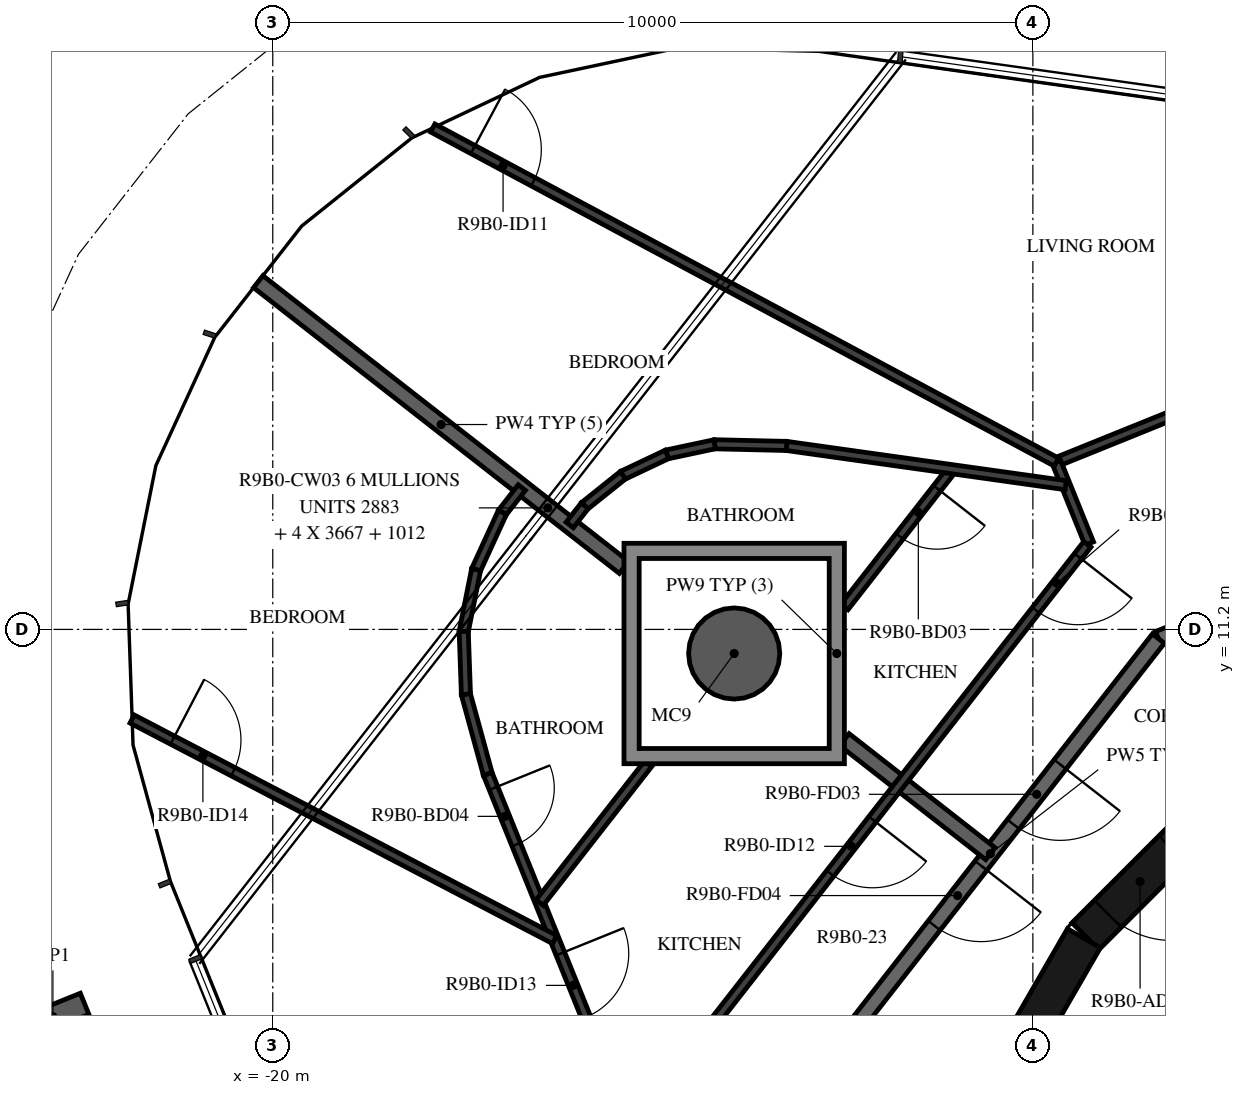
"""IFC4 building model, lengths in metres.
Left out: names, types, materials, properties, quantities, classifications, styles, units other than length and angle.
Written with IfcOpenShell. Run it as: python <this file> out.ifc"""

import sys

from ifc_helpers import new_model, si_unit, direction, frame, frame_2d, origin, origin_2d, place, context, subcontext, project, spatial, polyline, rectangle, hollow_circle, i_section, outline, extrude, element, fill, save


model = new_model("IFC4")
c1 = context("Model", 3, precision=1e-05, world=origin(), true_north=direction((0.0, 1.0)))
c2 = subcontext(c1, "Body", "Model", "MODEL_VIEW")
j1 = project(units=[si_unit("LENGTHUNIT", "METRE"), si_unit("PLANEANGLEUNIT", "RADIAN")], contexts=[c1])
p1 = place(None, origin())
s1 = spatial("IfcSite", under=j1, at=p1, CompositionType="ELEMENT")
p2 = place(p1, origin())
s2 = spatial("IfcBuilding", under=s1, at=p2, CompositionType="ELEMENT")
p3 = place(p2, frame((0.0, 0.0, 347.0)))
s3 = spatial("IfcBuildingStorey", under=s2, at=p3, CompositionType="ELEMENT", Elevation=347.0)
p4 = place(p3, frame((-13.929, 10.883, -0.38), z_axis=(0.0, 0.0, 1.0), x_axis=(1.0, 0.0, 0.0)))
e1 = element("IfcColumn", 1, at=p4, inside=s3, PredefinedType="COLUMN", context=c2, shape_type="SweptSolid", body=[
    extrude(hollow_circle(Radius=0.6, WallThickness=0.03, at=origin_2d()), origin(), (0.0, 0.0, 1.0), 3.5),
])
p5 = place(p3, frame((-22.893, 6.106, -0.38), z_axis=(0.0, 0.0, 1.0), x_axis=(-0.374606892434, 0.927183733755, 0.0)))
e2 = element("IfcColumn", 2, at=p5, inside=s3, PredefinedType="COLUMN", context=c2, shape_type="SweptSolid", body=[
    extrude(i_section(OverallWidth=0.3, OverallDepth=0.9, WebThickness=0.019, FlangeThickness=0.035, FilletRadius=0.03, at=origin_2d()), origin(), (0.0, 0.0, 1.0), 3.5),
])
p6 = place(p3, frame((-7.164, 9.308, 0.0), z_axis=(0.0, 0.0, 1.0), x_axis=(-0.707106781187, -0.707106781187, 0.0)))
e3 = element("IfcWall", 3, at=p6, inside=s3, PredefinedType="SHEAR", context=c2, shape_type="SweptSolid", body=[
    extrude(rectangle(XDim=3.032, YDim=0.5, at=frame_2d((1.516, 0.0))), origin(), (0.0, 0.0, 1.0), 3.12),
])
p7 = place(p6, frame((1.416, 0.0, 0.0)))
e4 = element("IfcOpeningElement", 4, at=p7, cuts=e3, PredefinedType="OPENING", context=c2, shape_type="SweptSolid", body=[
    extrude(rectangle(XDim=1.2, YDim=2.1, at=frame_2d((0.6, 1.05))), frame((0.0, 0.26, 0.0), z_axis=(0.0, -1.0, 0.0), x_axis=(1.0, 0.0, 0.0)), (0.0, 0.0, 1.0), 0.52),
])
p8 = place(p3, frame((-9.329, 7.137, 0.0), z_axis=(0.0, 0.0, 1.0), x_axis=(-0.500087131594, -0.865975092491, 0.0)))
e5 = element("IfcWall", 5, at=p8, inside=s3, PredefinedType="SHEAR", context=c2, shape_type="SweptSolid", body=[
    extrude(rectangle(XDim=3.033, YDim=0.5, at=frame_2d((1.516, 0.0))), origin(), (0.0, 0.0, 1.0), 3.12),
])
p9 = place(p3, frame((-1.691, 13.769, 0.0), z_axis=(0.0, 0.0, 1.0), x_axis=(-0.92717916932, -0.374618189599, 0.0)))
e6 = element("IfcWall", 6, at=p9, inside=s3, PredefinedType="STANDARD", context=c2, shape_type="SweptSolid", body=[
    extrude(rectangle(XDim=7.181, YDim=0.2, at=frame_2d((3.591, 0.0))), origin(), (0.0, 0.0, 1.0), 3.12),
])
p10 = place(p3, frame((-8.349, 11.079, 0.0), z_axis=(0.0, 0.0, 1.0), x_axis=(-0.615669112324, -0.78800478687, 0.0)))
e7 = element("IfcWall", 7, at=p10, inside=s3, PredefinedType="STANDARD", context=c2, shape_type="SweptSolid", body=[
    extrude(rectangle(XDim=7.181, YDim=0.2, at=frame_2d((3.591, 0.0))), origin(), (0.0, 0.0, 1.0), 3.12),
])
p11 = place(p10, frame((2.1, 0.0, 0.0)))
e8 = element("IfcOpeningElement", 8, at=p11, cuts=e7, PredefinedType="OPENING", context=c2, shape_type="SweptSolid", body=[
    extrude(rectangle(XDim=1.0, YDim=2.1, at=frame_2d((0.5, 1.05))), frame((0.0, 0.11, 0.0), z_axis=(0.0, -1.0, 0.0), x_axis=(1.0, 0.0, 0.0)), (0.0, 0.0, 1.0), 0.22),
])
p12 = place(p10, frame((3.79, 0.0, 0.0)))
e9 = element("IfcOpeningElement", 9, at=p12, cuts=e7, PredefinedType="OPENING", context=c2, shape_type="SweptSolid", body=[
    extrude(rectangle(XDim=1.0, YDim=2.1, at=frame_2d((0.5, 1.05))), frame((0.0, 0.11, 0.0), z_axis=(0.0, -1.0, 0.0), x_axis=(1.0, 0.0, 0.0)), (0.0, 0.0, 1.0), 0.22),
])
p13 = place(p3, frame((-12.479, 9.75, 0.0), z_axis=(0.0, 0.0, 1.0), x_axis=(0.788050197026, -0.615610986717, 0.0)))
e10 = element("IfcWall", 10, at=p13, inside=s3, PredefinedType="STANDARD", context=c2, shape_type="SweptSolid", body=[
    extrude(rectangle(XDim=2.437, YDim=0.2, at=frame_2d((1.218, 0.0))), origin(), (0.0, 0.0, 1.0), 3.12),
])
p14 = place(p3, frame((-20.191, 15.775, 0.0), z_axis=(0.0, 0.0, 1.0), x_axis=(0.788021948923, -0.615647145706, 0.0)))
e11 = element("IfcWall", 11, at=p14, inside=s3, PredefinedType="STANDARD", context=c2, shape_type="SweptSolid", body=[
    extrude(rectangle(XDim=6.106, YDim=0.2, at=frame_2d((3.053, 0.0))), origin(), (0.0, 0.0, 1.0), 3.12),
])
p15 = place(p3, frame((-8.115, 14.039, 0.0), z_axis=(0.0, 0.0, 1.0), x_axis=(-0.927153589835, -0.374681492546, 0.0)))
e12 = element("IfcWall", 12, at=p15, inside=s3, PredefinedType="PARTITIONING", context=c2, shape_type="SweptSolid", body=[
    extrude(rectangle(XDim=1.7, YDim=0.12, at=frame_2d((0.85, 0.0))), origin(), (0.0, 0.0, 1.0), 3.12),
])
p16 = place(p3, frame((-9.691, 13.402, 0.0), z_axis=(0.0, 0.0, 1.0), x_axis=(0.374484003097, -0.927233374844, 0.0)))
e13 = element("IfcWall", 13, at=p16, inside=s3, PredefinedType="PARTITIONING", context=c2, shape_type="SweptSolid", body=[
    extrude(rectangle(XDim=1.156, YDim=0.12, at=frame_2d((0.578, 0.0))), origin(), (0.0, 0.0, 1.0), 3.12),
])
p17 = place(p3, frame((-9.283, 12.319, 0.0), z_axis=(0.0, 0.0, 1.0), x_axis=(-0.61567489546, -0.788000268464, 0.0)))
e14 = element("IfcWall", 14, at=p17, inside=s3, PredefinedType="PARTITIONING", context=c2, shape_type="SweptSolid", body=[
    extrude(rectangle(XDim=7.985, YDim=0.12, at=frame_2d((3.992, 0.0))), origin(), (0.0, 0.0, 1.0), 3.12),
])
p18 = place(p17, frame((0.2, 0.0, 0.0)))
e15 = element("IfcOpeningElement", 15, at=p18, cuts=e14, PredefinedType="OPENING", context=c2, shape_type="SweptSolid", body=[
    extrude(rectangle(XDim=0.9, YDim=2.1, at=frame_2d((0.45, 1.05))), frame((0.0, 0.07, 0.0), z_axis=(0.0, -1.0, 0.0), x_axis=(1.0, 0.0, 0.0)), (0.0, 0.0, 1.0), 0.14),
])
p19 = place(p17, frame((4.592, 0.0, 0.0)))
e16 = element("IfcOpeningElement", 16, at=p19, cuts=e14, PredefinedType="OPENING", context=c2, shape_type="SweptSolid", body=[
    extrude(rectangle(XDim=0.9, YDim=2.1, at=frame_2d((0.45, 1.05))), frame((0.0, 0.07, 0.0), z_axis=(0.0, -1.0, 0.0), x_axis=(1.0, 0.0, 0.0)), (0.0, 0.0, 1.0), 0.14),
])
p20 = place(p3, frame((-17.896, 17.797, 0.0), z_axis=(0.0, 0.0, 1.0), x_axis=(0.88150492406, -0.4721748287, 0.0)))
e17 = element("IfcWall", 17, at=p20, inside=s3, PredefinedType="PARTITIONING", context=c2, shape_type="SweptSolid", body=[
    extrude(rectangle(XDim=9.308, YDim=0.12, at=frame_2d((4.654, 0.0))), origin(), (0.0, 0.0, 1.0), 3.12),
])
p21 = place(p20, frame((0.6, 0.0, 0.0)))
e18 = element("IfcOpeningElement", 18, at=p21, cuts=e17, PredefinedType="OPENING", context=c2, shape_type="SweptSolid", body=[
    extrude(rectangle(XDim=0.9, YDim=2.1, at=frame_2d((0.45, 1.05))), frame((0.0, 0.07, 0.0), z_axis=(0.0, -1.0, 0.0), x_axis=(1.0, 0.0, 0.0)), (0.0, 0.0, 1.0), 0.14),
])
p22 = place(p3, frame((-11.064, 13.308, 0.0), z_axis=(0.0, 0.0, 1.0), x_axis=(-0.615681126827, -0.787995399777, 0.0)))
e19 = element("IfcWall", 19, at=p22, inside=s3, PredefinedType="PARTITIONING", context=c2, shape_type="SweptSolid", body=[
    extrude(rectangle(XDim=2.3, YDim=0.12, at=frame_2d((1.15, 0.0))), origin(), (0.0, 0.0, 1.0), 3.12),
])
p23 = place(p22, frame((0.32, 0.0, 0.0)))
e20 = element("IfcOpeningElement", 20, at=p23, cuts=e19, PredefinedType="OPENING", context=c2, shape_type="SweptSolid", body=[
    extrude(rectangle(XDim=0.8, YDim=2.1, at=frame_2d((0.4, 1.05))), frame((0.0, 0.07, 0.0), z_axis=(0.0, -1.0, 0.0), x_axis=(1.0, 0.0, 0.0)), (0.0, 0.0, 1.0), 0.14),
])
p24 = place(p3, frame((-9.568, 13.097, 0.0), z_axis=(0.0, 0.0, 1.0), x_axis=(-0.990266931728, 0.13918119099, 0.0)))
e21 = element("IfcWall", 21, at=p24, inside=s3, PredefinedType="PARTITIONING", context=c2, shape_type="SweptSolid", body=[
    extrude(rectangle(XDim=3.708, YDim=0.12, at=frame_2d((1.854, 0.0))), origin(), (0.0, 0.0, 1.0), 3.12),
])
p25 = place(p3, frame((-13.24, 13.614, 0.0), z_axis=(0.0, 0.0, 1.0), x_axis=(-0.999730529074, 0.023213557177, 0.0)))
e22 = element("IfcWall", 22, at=p25, inside=s3, PredefinedType="PARTITIONING", context=c2, shape_type="SweptSolid", body=[
    extrude(rectangle(XDim=0.947, YDim=0.12, at=frame_2d((0.473, 0.0))), origin(), (0.0, 0.0, 1.0), 3.12),
])
p26 = place(p3, frame((-14.186, 13.635, 0.0), z_axis=(0.0, 0.0, 1.0), x_axis=(-0.978217752025, -0.207581380725, 0.0)))
e23 = element("IfcWall", 23, at=p26, inside=s3, PredefinedType="PARTITIONING", context=c2, shape_type="SweptSolid", body=[
    extrude(rectangle(XDim=0.642, YDim=0.12, at=frame_2d((0.321, 0.0))), origin(), (0.0, 0.0, 1.0), 3.12),
])
for number, where, z_axis, x_axis in (
    (24, (-14.814, 13.502, 0.0), (0.0, 0.0, 1.0), (-0.904, -0.428, 0.0)),
    (25, (-15.395, 13.227, 0.0), (0.0, 0.0, 1.0), (-0.781, -0.625, 0.0)),
):
    element("IfcWall", number, at=place(p3, frame(where, z_axis=z_axis, x_axis=x_axis)), inside=s3, PredefinedType="PARTITIONING", context=c2, shape_type="SweptSolid", body=[
        extrude(rectangle(XDim=0.642, YDim=0.12, at=frame_2d((0.321, 0.0))), origin(), (0.0, 0.0, 1.0), 3.12),
    ])
p27 = place(p3, frame((-15.896, 12.826, 0.0), z_axis=(0.0, 0.0, 1.0), x_axis=(-0.615466865985, -0.788162760396, 0.0)))
e26 = element("IfcWall", 26, at=p27, inside=s3, PredefinedType="PARTITIONING", context=c2, shape_type="SweptSolid", body=[
    extrude(rectangle(XDim=0.321, YDim=0.12, at=frame_2d((0.16, 0.0))), origin(), (0.0, 0.0, 1.0), 3.12),
])
p28 = place(p3, frame((-16.724, 13.066, 0.0), z_axis=(0.0, 0.0, 1.0), x_axis=(-0.615895388651, -0.787827944565, 0.0)))
e27 = element("IfcWall", 27, at=p28, inside=s3, PredefinedType="PARTITIONING", context=c2, shape_type="SweptSolid", body=[
    extrude(rectangle(XDim=0.415, YDim=0.12, at=frame_2d((0.207, 0.0))), origin(), (0.0, 0.0, 1.0), 3.12),
])
for number, where, z_axis, x_axis in (
    (28, (-16.979, 12.74, 0.0), (0.0, 0.0, 1.0), (-0.417, -0.909, 0.0)),
    (29, (-17.325, 11.986, 0.0), (0.0, 0.0, 1.0), (-0.197, -0.98, 0.0)),
    (30, (-17.488, 11.173, 0.0), (0.0, 0.0, 1.0), (0.035, -0.999, 0.0)),
):
    element("IfcWall", number, at=place(p3, frame(where, z_axis=z_axis, x_axis=x_axis)), inside=s3, PredefinedType="PARTITIONING", context=c2, shape_type="SweptSolid", body=[
        extrude(rectangle(XDim=0.829, YDim=0.12, at=frame_2d((0.415, 0.0))), origin(), (0.0, 0.0, 1.0), 3.12),
    ])
p29 = place(p3, frame((-17.459, 10.345, 0.0), z_axis=(0.0, 0.0, 1.0), x_axis=(0.264409755069, -0.964410432038, 0.0)))
e31 = element("IfcWall", 31, at=p29, inside=s3, PredefinedType="PARTITIONING", context=c2, shape_type="SweptSolid", body=[
    extrude(rectangle(XDim=1.087, YDim=0.12, at=frame_2d((0.543, 0.0))), origin(), (0.0, 0.0, 1.0), 3.12),
])
p30 = place(p3, frame((-17.171, 9.297, 0.0), z_axis=(0.0, 0.0, 1.0), x_axis=(0.374594127493, -0.927188891029, 0.0)))
e32 = element("IfcWall", 32, at=p30, inside=s3, PredefinedType="PARTITIONING", context=c2, shape_type="SweptSolid", body=[
    extrude(rectangle(XDim=5.174, YDim=0.12, at=frame_2d((2.587, 0.0))), origin(), (0.0, 0.0, 1.0), 3.12),
])
p31 = place(p30, frame((2.548, 0.0, 0.0)))
e33 = element("IfcOpeningElement", 33, at=p31, cuts=e32, PredefinedType="OPENING", context=c2, shape_type="SweptSolid", body=[
    extrude(rectangle(XDim=0.9, YDim=2.1, at=frame_2d((0.45, 1.05))), frame((0.0, 0.07, 0.0), z_axis=(0.0, -1.0, 0.0), x_axis=(1.0, 0.0, 0.0)), (0.0, 0.0, 1.0), 0.14),
])
p32 = place(p30, frame((0.2, 0.0, 0.0)))
e34 = element("IfcOpeningElement", 34, at=p32, cuts=e32, PredefinedType="OPENING", context=c2, shape_type="SweptSolid", body=[
    extrude(rectangle(XDim=0.8, YDim=2.1, at=frame_2d((0.4, 1.05))), frame((0.0, 0.07, 0.0), z_axis=(0.0, -1.0, 0.0), x_axis=(1.0, 0.0, 0.0)), (0.0, 0.0, 1.0), 0.14),
])
p33 = place(p3, frame((-16.488, 7.606, 0.0), z_axis=(0.0, 0.0, 1.0), x_axis=(0.615637911154, 0.788029163388, 0.0)))
e35 = element("IfcWall", 35, at=p33, inside=s3, PredefinedType="PARTITIONING", context=c2, shape_type="SweptSolid", body=[
    extrude(rectangle(XDim=2.318, YDim=0.12, at=frame_2d((1.159, 0.0))), origin(), (0.0, 0.0, 1.0), 3.12),
])
p34 = place(p3, frame((-21.85, 10.021, 0.0), z_axis=(0.0, 0.0, 1.0), x_axis=(0.886479988406, -0.462766928546, 0.0)))
e36 = element("IfcWall", 36, at=p34, inside=s3, PredefinedType="PARTITIONING", context=c2, shape_type="SweptSolid", body=[
    extrude(rectangle(XDim=6.27, YDim=0.12, at=frame_2d((3.135, 0.0))), origin(), (0.0, 0.0, 1.0), 3.12),
])
p35 = place(p34, frame((0.6, 0.0, 0.0)))
e37 = element("IfcOpeningElement", 37, at=p35, cuts=e36, PredefinedType="OPENING", context=c2, shape_type="SweptSolid", body=[
    extrude(rectangle(XDim=0.9, YDim=2.1, at=frame_2d((0.45, 1.05))), frame((0.0, 0.07, 0.0), z_axis=(0.0, -1.0, 0.0), x_axis=(1.0, 0.0, 0.0)), (0.0, 0.0, 1.0), 0.14),
])
p36 = place(p3, origin())
e38 = element("IfcWall", 38, at=p36, inside=s3, PredefinedType="STANDARD", context=c2, shape_type="SweptSolid", body=[
    extrude(outline(polyline([(-12.479, 12.333), (-12.479, 9.433), (-15.379, 9.433), (-15.379, 12.333), (-12.479, 12.333)]), holes=[polyline([(-15.179, 9.633), (-12.679, 9.633), (-12.679, 12.133), (-15.179, 12.133), (-15.179, 9.633)])]), origin(), (0.0, 0.0, 1.0), 3.12),
])
p37 = place(p7, origin())
e39 = element("IfcDoor", 39, at=p37, inside=s3, OperationType="SINGLE_SWING_RIGHT", PredefinedType="DOOR", context=c2, shape_type="SweptSolid", body=[
    extrude(rectangle(XDim=1.2, YDim=2.1, at=frame_2d((0.6, 1.05))), frame((0.0, 0.025, 0.0), z_axis=(0.0, -1.0, 0.0), x_axis=(1.0, 0.0, 0.0)), (0.0, 0.0, 1.0), 0.05),
])
fill(e4, e39)
p38 = place(p11, origin())
e40 = element("IfcDoor", 40, at=p38, inside=s3, OperationType="SINGLE_SWING_RIGHT", PredefinedType="DOOR", context=c2, shape_type="SweptSolid", body=[
    extrude(rectangle(XDim=1.0, YDim=2.1, at=frame_2d((0.5, 1.05))), frame((0.0, 0.025, 0.0), z_axis=(0.0, -1.0, 0.0), x_axis=(1.0, 0.0, 0.0)), (0.0, 0.0, 1.0), 0.05),
])
fill(e8, e40)
p39 = place(p18, origin())
e41 = element("IfcDoor", 41, at=p39, inside=s3, OperationType="SINGLE_SWING_RIGHT", PredefinedType="DOOR", context=c2, shape_type="SweptSolid", body=[
    extrude(rectangle(XDim=0.9, YDim=2.1, at=frame_2d((0.45, 1.05))), frame((0.0, 0.025, 0.0), z_axis=(0.0, -1.0, 0.0), x_axis=(1.0, 0.0, 0.0)), (0.0, 0.0, 1.0), 0.05),
])
fill(e15, e41)
p40 = place(p23, origin())
e42 = element("IfcDoor", 42, at=p40, inside=s3, OperationType="SINGLE_SWING_RIGHT", PredefinedType="DOOR", context=c2, shape_type="SweptSolid", body=[
    extrude(rectangle(XDim=0.8, YDim=2.1, at=frame_2d((0.4, 1.05))), frame((0.0, 0.025, 0.0), z_axis=(0.0, -1.0, 0.0), x_axis=(1.0, 0.0, 0.0)), (0.0, 0.0, 1.0), 0.05),
])
fill(e20, e42)
p41 = place(p21, origin())
e43 = element("IfcDoor", 43, at=p41, inside=s3, OperationType="SINGLE_SWING_RIGHT", PredefinedType="DOOR", context=c2, shape_type="SweptSolid", body=[
    extrude(rectangle(XDim=0.9, YDim=2.1, at=frame_2d((0.45, 1.05))), frame((0.0, 0.025, 0.0), z_axis=(0.0, -1.0, 0.0), x_axis=(1.0, 0.0, 0.0)), (0.0, 0.0, 1.0), 0.05),
])
fill(e18, e43)
p42 = place(p12, origin())
e44 = element("IfcDoor", 44, at=p42, inside=s3, OperationType="SINGLE_SWING_LEFT", PredefinedType="DOOR", context=c2, shape_type="SweptSolid", body=[
    extrude(rectangle(XDim=1.0, YDim=2.1, at=frame_2d((0.5, 1.05))), frame((0.0, 0.025, 0.0), z_axis=(0.0, -1.0, 0.0), x_axis=(1.0, 0.0, 0.0)), (0.0, 0.0, 1.0), 0.05),
])
fill(e9, e44)
p43 = place(p19, origin())
e45 = element("IfcDoor", 45, at=p43, inside=s3, OperationType="SINGLE_SWING_LEFT", PredefinedType="DOOR", context=c2, shape_type="SweptSolid", body=[
    extrude(rectangle(XDim=0.9, YDim=2.1, at=frame_2d((0.45, 1.05))), frame((0.0, 0.025, 0.0), z_axis=(0.0, -1.0, 0.0), x_axis=(1.0, 0.0, 0.0)), (0.0, 0.0, 1.0), 0.05),
])
fill(e16, e45)
p44 = place(p31, origin())
e46 = element("IfcDoor", 46, at=p44, inside=s3, OperationType="SINGLE_SWING_LEFT", PredefinedType="DOOR", context=c2, shape_type="SweptSolid", body=[
    extrude(rectangle(XDim=0.9, YDim=2.1, at=frame_2d((0.45, 1.05))), frame((0.0, 0.025, 0.0), z_axis=(0.0, -1.0, 0.0), x_axis=(1.0, 0.0, 0.0)), (0.0, 0.0, 1.0), 0.05),
])
fill(e33, e46)
p45 = place(p35, origin())
e47 = element("IfcDoor", 47, at=p45, inside=s3, OperationType="SINGLE_SWING_LEFT", PredefinedType="DOOR", context=c2, shape_type="SweptSolid", body=[
    extrude(rectangle(XDim=0.9, YDim=2.1, at=frame_2d((0.45, 1.05))), frame((0.0, 0.025, 0.0), z_axis=(0.0, -1.0, 0.0), x_axis=(1.0, 0.0, 0.0)), (0.0, 0.0, 1.0), 0.05),
])
fill(e37, e47)
p46 = place(p32, origin())
e48 = element("IfcDoor", 48, at=p46, inside=s3, OperationType="SINGLE_SWING_RIGHT", PredefinedType="DOOR", context=c2, shape_type="SweptSolid", body=[
    extrude(rectangle(XDim=0.8, YDim=2.1, at=frame_2d((0.4, 1.05))), frame((0.0, 0.025, 0.0), z_axis=(0.0, -1.0, 0.0), x_axis=(1.0, 0.0, 0.0)), (0.0, 0.0, 1.0), 0.05),
])
fill(e34, e48)
save(model, sys.argv[1])
